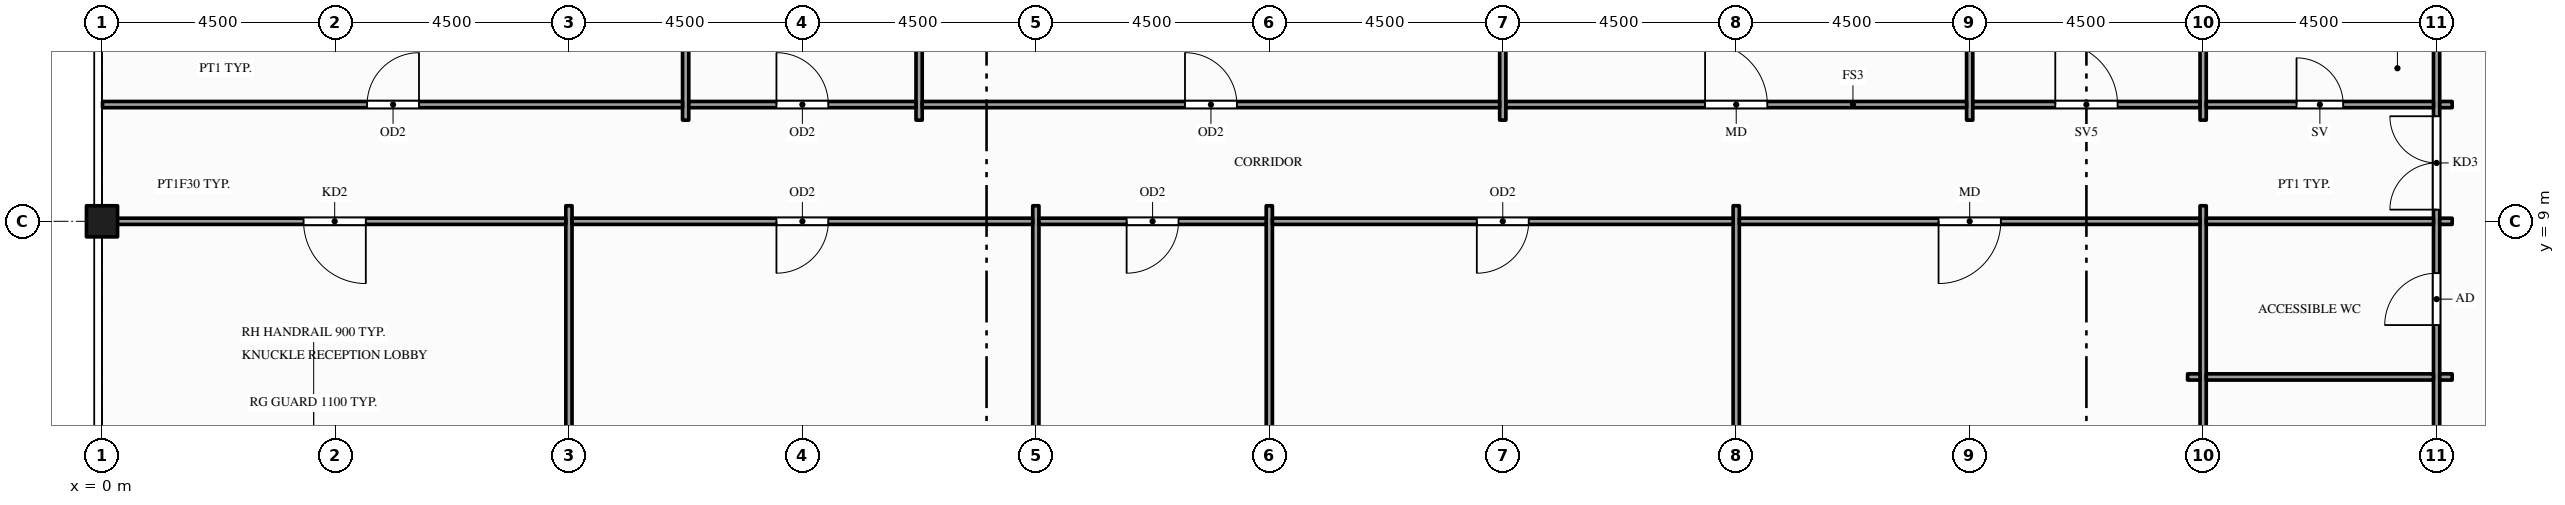
"""IFC4 building model, lengths in metres.
Left out: names, types, materials, properties, quantities, classifications, styles, units other than length and angle.
Written with IfcOpenShell. Run it as: python <this file> out.ifc"""

import sys

from ifc_helpers import new_model, si_unit, direction, frame, frame_2d, origin, origin_2d, place, context, subcontext, project, spatial, rectangle, hollow_rectangle, extrude, element, fill, save


model = new_model("IFC4")
c1 = context("Model", 3, precision=1e-05, world=origin(), true_north=direction((0.0, 1.0)))
c2 = subcontext(c1, "Body", "Model", "MODEL_VIEW")
j1 = project(units=[si_unit("LENGTHUNIT", "METRE"), si_unit("PLANEANGLEUNIT", "RADIAN")], contexts=[c1])
p1 = place(None, origin())
s1 = spatial("IfcSite", under=j1, at=p1, CompositionType="ELEMENT")
p2 = place(p1, origin())
s2 = spatial("IfcBuilding", under=s1, at=p2, CompositionType="ELEMENT")
p3 = place(p2, frame((0.0, 0.0, 309.5)))
s3 = spatial("IfcBuildingStorey", under=s2, at=p3, CompositionType="ELEMENT", Elevation=309.5)
p4 = place(p3, frame((0.0, 9.0, -0.15), z_axis=(0.0, 0.0, 1.0), x_axis=(1.0, 0.0, 0.0)))
e1 = element("IfcColumn", 1, at=p4, inside=s3, PredefinedType="COLUMN", context=c2, shape_type="SweptSolid", body=[
    extrude(hollow_rectangle(XDim=0.6, YDim=0.6, WallThickness=0.03, at=origin_2d()), origin(), (0.0, 0.0, 1.0), 4.5),
])
p5 = place(p3, frame((9.0, 3.875, 0.0), z_axis=(0.0, 0.0, 1.0), x_axis=(0.0, 1.0, 0.0)))
e2 = element("IfcWall", 2, at=p5, inside=s3, PredefinedType="PARTITIONING", context=c2, shape_type="SweptSolid", body=[
    extrude(rectangle(XDim=5.425, YDim=0.12, at=frame_2d((2.712, 0.0))), origin(), (0.0, 0.0, 1.0), 3.359),
])
for number, where, z_axis, x_axis in (
    (3, (11.25, 10.95, 0.0), (0.0, 0.0, 1.0), (0.0, 1.0, 0.0)),
    (4, (15.75, 10.95, 0.0), (0.0, 0.0, 1.0), (0.0, 1.0, 0.0)),
):
    element("IfcWall", number, at=place(p3, frame(where, z_axis=z_axis, x_axis=x_axis)), inside=s3, PredefinedType="PARTITIONING", context=c2, shape_type="SweptSolid", body=[
        extrude(rectangle(XDim=11.54, YDim=0.12, at=frame_2d((5.77, 0.0))), origin(), (0.0, 0.0, 1.0), 3.359),
    ])
for number, where, z_axis, x_axis in (
    (5, (18.0, 0.01, 0.0), (0.0, 0.0, 1.0), (0.0, 1.0, 0.0)),
    (6, (22.5, 0.01, 0.0), (0.0, 0.0, 1.0), (0.0, 1.0, 0.0)),
):
    element("IfcWall", number, at=place(p3, frame(where, z_axis=z_axis, x_axis=x_axis)), inside=s3, PredefinedType="PARTITIONING", context=c2, shape_type="SweptSolid", body=[
        extrude(rectangle(XDim=9.29, YDim=0.12, at=frame_2d((4.645, 0.0))), origin(), (0.0, 0.0, 1.0), 3.359),
    ])
p6 = place(p3, frame((27.0, 10.95, 0.0), z_axis=(0.0, 0.0, 1.0), x_axis=(0.0, 1.0, 0.0)))
e7 = element("IfcWall", 7, at=p6, inside=s3, PredefinedType="PARTITIONING", context=c2, shape_type="SweptSolid", body=[
    extrude(rectangle(XDim=11.54, YDim=0.12, at=frame_2d((5.77, 0.0))), origin(), (0.0, 0.0, 1.0), 3.359),
])
p7 = place(p3, frame((31.5, 0.01, 0.0), z_axis=(0.0, 0.0, 1.0), x_axis=(0.0, 1.0, 0.0)))
e8 = element("IfcWall", 8, at=p7, inside=s3, PredefinedType="PARTITIONING", context=c2, shape_type="SweptSolid", body=[
    extrude(rectangle(XDim=9.29, YDim=0.12, at=frame_2d((4.645, 0.0))), origin(), (0.0, 0.0, 1.0), 3.359),
])
p8 = place(p3, frame((36.0, 10.95, 0.0), z_axis=(0.0, 0.0, 1.0), x_axis=(0.0, 1.0, 0.0)))
e9 = element("IfcWall", 9, at=p8, inside=s3, PredefinedType="PARTITIONING", context=c2, shape_type="SweptSolid", body=[
    extrude(rectangle(XDim=11.54, YDim=0.12, at=frame_2d((5.77, 0.0))), origin(), (0.0, 0.0, 1.0), 3.359),
])
p9 = place(p3, frame((40.5, 0.01, 0.0), z_axis=(0.0, 0.0, 1.0), x_axis=(0.0, 1.0, 0.0)))
e10 = element("IfcWall", 10, at=p9, inside=s3, PredefinedType="PARTITIONING", context=c2, shape_type="SweptSolid", body=[
    extrude(rectangle(XDim=9.29, YDim=0.12, at=frame_2d((4.645, 0.0))), origin(), (0.0, 0.0, 1.0), 3.359),
])
p10 = place(p3, frame((40.5, 10.95, 0.0), z_axis=(0.0, 0.0, 1.0), x_axis=(0.0, 1.0, 0.0)))
e11 = element("IfcWall", 11, at=p10, inside=s3, PredefinedType="PARTITIONING", context=c2, shape_type="SweptSolid", body=[
    extrude(rectangle(XDim=11.54, YDim=0.12, at=frame_2d((5.77, 0.0))), origin(), (0.0, 0.0, 1.0), 3.359),
])
p11 = place(p3, frame((45.0, 0.01, 0.0), z_axis=(0.0, 0.0, 1.0), x_axis=(0.0, 1.0, 0.0)))
e12 = element("IfcWall", 12, at=p11, inside=s3, PredefinedType="PARTITIONING", context=c2, shape_type="SweptSolid", body=[
    extrude(rectangle(XDim=22.48, YDim=0.12, at=frame_2d((11.24, 0.0))), origin(), (0.0, 0.0, 1.0), 3.359),
])
p12 = place(p11, frame((9.215, 0.0, 0.0)))
e13 = element("IfcOpeningElement", 13, at=p12, cuts=e12, PredefinedType="OPENING", context=c2, shape_type="SweptSolid", body=[
    extrude(rectangle(XDim=1.8, YDim=2.1, at=frame_2d((0.9, 1.05))), frame((0.0, 0.07, 0.0), z_axis=(0.0, -1.0, 0.0), x_axis=(1.0, 0.0, 0.0)), (0.0, 0.0, 1.0), 0.14),
])
p13 = place(p11, frame((0.99, 0.0, 0.0)))
e14 = element("IfcOpeningElement", 14, at=p13, cuts=e12, PredefinedType="OPENING", context=c2, shape_type="SweptSolid", body=[
    extrude(rectangle(XDim=0.9, YDim=2.1, at=frame_2d((0.45, 1.05))), frame((0.0, 0.07, 0.0), z_axis=(0.0, -1.0, 0.0), x_axis=(1.0, 0.0, 0.0)), (0.0, 0.0, 1.0), 0.14),
])
p14 = place(p11, frame((4.04, 0.0, 0.0)))
e15 = element("IfcOpeningElement", 15, at=p14, cuts=e12, PredefinedType="OPENING", context=c2, shape_type="SweptSolid", body=[
    extrude(rectangle(XDim=0.9, YDim=2.1, at=frame_2d((0.45, 1.05))), frame((0.0, 0.07, 0.0), z_axis=(0.0, -1.0, 0.0), x_axis=(1.0, 0.0, 0.0)), (0.0, 0.0, 1.0), 0.14),
])
p15 = place(p11, frame((6.99, 0.0, 0.0)))
e16 = element("IfcOpeningElement", 16, at=p15, cuts=e12, PredefinedType="OPENING", context=c2, shape_type="SweptSolid", body=[
    extrude(rectangle(XDim=1.0, YDim=2.1, at=frame_2d((0.5, 1.05))), frame((0.0, 0.07, 0.0), z_axis=(0.0, -1.0, 0.0), x_axis=(1.0, 0.0, 0.0)), (0.0, 0.0, 1.0), 0.14),
])
p16 = place(p3, frame((40.2, 6.0, 0.0), z_axis=(0.0, 0.0, 1.0), x_axis=(1.0, 0.0, 0.0)))
e17 = element("IfcWall", 17, at=p16, inside=s3, PredefinedType="PARTITIONING", context=c2, shape_type="SweptSolid", body=[
    extrude(rectangle(XDim=0.24, YDim=0.12, at=frame_2d((0.12, 0.0))), origin(), (0.0, 0.0, 1.0), 3.359),
])
p17 = place(p3, frame((40.56, 6.0, 0.0), z_axis=(0.0, 0.0, 1.0), x_axis=(1.0, 0.0, 0.0)))
e18 = element("IfcWall", 18, at=p17, inside=s3, PredefinedType="PARTITIONING", context=c2, shape_type="SweptSolid", body=[
    extrude(rectangle(XDim=4.38, YDim=0.12, at=frame_2d((2.19, 0.0))), origin(), (0.0, 0.0, 1.0), 3.359),
])
p18 = place(p3, frame((45.06, 6.0, 0.0), z_axis=(0.0, 0.0, 1.0), x_axis=(1.0, 0.0, 0.0)))
e19 = element("IfcWall", 19, at=p18, inside=s3, PredefinedType="PARTITIONING", context=c2, shape_type="SweptSolid", body=[
    extrude(rectangle(XDim=0.24, YDim=0.12, at=frame_2d((0.12, 0.0))), origin(), (0.0, 0.0, 1.0), 3.359),
])
p19 = place(p3, frame((0.01, 9.0, 0.0), z_axis=(0.0, 0.0, 1.0), x_axis=(1.0, 0.0, 0.0)))
e20 = element("IfcWall", 20, at=p19, inside=s3, PredefinedType="PARTITIONING", context=c2, shape_type="SweptSolid", body=[
    extrude(rectangle(XDim=8.93, YDim=0.12, at=frame_2d((4.465, 0.0))), origin(), (0.0, 0.0, 1.0), 3.359),
])
p20 = place(p19, frame((3.875, 0.0, 0.0)))
e21 = element("IfcOpeningElement", 21, at=p20, cuts=e20, PredefinedType="OPENING", context=c2, shape_type="SweptSolid", body=[
    extrude(rectangle(XDim=1.2, YDim=2.1, at=frame_2d((0.6, 1.05))), frame((0.0, 0.07, 0.0), z_axis=(0.0, -1.0, 0.0), x_axis=(1.0, 0.0, 0.0)), (0.0, 0.0, 1.0), 0.14),
])
p21 = place(p3, frame((9.06, 9.0, 0.0), z_axis=(0.0, 0.0, 1.0), x_axis=(1.0, 0.0, 0.0)))
e22 = element("IfcWall", 22, at=p21, inside=s3, PredefinedType="PARTITIONING", context=c2, shape_type="SweptSolid", body=[
    extrude(rectangle(XDim=8.88, YDim=0.12, at=frame_2d((4.44, 0.0))), origin(), (0.0, 0.0, 1.0), 3.359),
])
p22 = place(p21, frame((3.94, 0.0, 0.0)))
e23 = element("IfcOpeningElement", 23, at=p22, cuts=e22, PredefinedType="OPENING", context=c2, shape_type="SweptSolid", body=[
    extrude(rectangle(XDim=1.0, YDim=2.1, at=frame_2d((0.5, 1.05))), frame((0.0, 0.07, 0.0), z_axis=(0.0, -1.0, 0.0), x_axis=(1.0, 0.0, 0.0)), (0.0, 0.0, 1.0), 0.14),
])
p23 = place(p3, frame((18.06, 9.0, 0.0), z_axis=(0.0, 0.0, 1.0), x_axis=(1.0, 0.0, 0.0)))
e24 = element("IfcWall", 24, at=p23, inside=s3, PredefinedType="PARTITIONING", context=c2, shape_type="SweptSolid", body=[
    extrude(rectangle(XDim=4.38, YDim=0.12, at=frame_2d((2.19, 0.0))), origin(), (0.0, 0.0, 1.0), 3.359),
])
p24 = place(p23, frame((1.69, 0.0, 0.0)))
e25 = element("IfcOpeningElement", 25, at=p24, cuts=e24, PredefinedType="OPENING", context=c2, shape_type="SweptSolid", body=[
    extrude(rectangle(XDim=1.0, YDim=2.1, at=frame_2d((0.5, 1.05))), frame((0.0, 0.07, 0.0), z_axis=(0.0, -1.0, 0.0), x_axis=(1.0, 0.0, 0.0)), (0.0, 0.0, 1.0), 0.14),
])
p25 = place(p3, frame((22.56, 9.0, 0.0), z_axis=(0.0, 0.0, 1.0), x_axis=(1.0, 0.0, 0.0)))
e26 = element("IfcWall", 26, at=p25, inside=s3, PredefinedType="PARTITIONING", context=c2, shape_type="SweptSolid", body=[
    extrude(rectangle(XDim=8.88, YDim=0.12, at=frame_2d((4.44, 0.0))), origin(), (0.0, 0.0, 1.0), 3.359),
])
p26 = place(p25, frame((3.94, 0.0, 0.0)))
e27 = element("IfcOpeningElement", 27, at=p26, cuts=e26, PredefinedType="OPENING", context=c2, shape_type="SweptSolid", body=[
    extrude(rectangle(XDim=1.0, YDim=2.1, at=frame_2d((0.5, 1.05))), frame((0.0, 0.07, 0.0), z_axis=(0.0, -1.0, 0.0), x_axis=(1.0, 0.0, 0.0)), (0.0, 0.0, 1.0), 0.14),
])
p27 = place(p3, frame((31.56, 9.0, 0.0), z_axis=(0.0, 0.0, 1.0), x_axis=(1.0, 0.0, 0.0)))
e28 = element("IfcWall", 28, at=p27, inside=s3, PredefinedType="PARTITIONING", context=c2, shape_type="SweptSolid", body=[
    extrude(rectangle(XDim=8.88, YDim=0.12, at=frame_2d((4.44, 0.0))), origin(), (0.0, 0.0, 1.0), 3.359),
])
p28 = place(p27, frame((3.84, 0.0, 0.0)))
e29 = element("IfcOpeningElement", 29, at=p28, cuts=e28, PredefinedType="OPENING", context=c2, shape_type="SweptSolid", body=[
    extrude(rectangle(XDim=1.2, YDim=2.1, at=frame_2d((0.6, 1.05))), frame((0.0, 0.07, 0.0), z_axis=(0.0, -1.0, 0.0), x_axis=(1.0, 0.0, 0.0)), (0.0, 0.0, 1.0), 0.14),
])
p29 = place(p3, frame((40.56, 9.0, 0.0), z_axis=(0.0, 0.0, 1.0), x_axis=(1.0, 0.0, 0.0)))
e30 = element("IfcWall", 30, at=p29, inside=s3, PredefinedType="PARTITIONING", context=c2, shape_type="SweptSolid", body=[
    extrude(rectangle(XDim=4.38, YDim=0.12, at=frame_2d((2.19, 0.0))), origin(), (0.0, 0.0, 1.0), 3.359),
])
p30 = place(p3, frame((45.06, 9.0, 0.0), z_axis=(0.0, 0.0, 1.0), x_axis=(1.0, 0.0, 0.0)))
e31 = element("IfcWall", 31, at=p30, inside=s3, PredefinedType="PARTITIONING", context=c2, shape_type="SweptSolid", body=[
    extrude(rectangle(XDim=0.24, YDim=0.12, at=frame_2d((0.12, 0.0))), origin(), (0.0, 0.0, 1.0), 3.359),
])
p31 = place(p3, frame((0.01, 11.25, 0.0), z_axis=(0.0, 0.0, 1.0), x_axis=(1.0, 0.0, 0.0)))
e32 = element("IfcWall", 32, at=p31, inside=s3, PredefinedType="PARTITIONING", context=c2, shape_type="SweptSolid", body=[
    extrude(rectangle(XDim=11.18, YDim=0.12, at=frame_2d((5.59, 0.0))), origin(), (0.0, 0.0, 1.0), 3.359),
])
p32 = place(p31, frame((5.1, 0.0, 0.0)))
e33 = element("IfcOpeningElement", 33, at=p32, cuts=e32, PredefinedType="OPENING", context=c2, shape_type="SweptSolid", body=[
    extrude(rectangle(XDim=1.0, YDim=2.1, at=frame_2d((0.5, 1.05))), frame((0.0, 0.07, 0.0), z_axis=(0.0, -1.0, 0.0), x_axis=(1.0, 0.0, 0.0)), (0.0, 0.0, 1.0), 0.14),
])
p33 = place(p3, frame((11.31, 11.25, 0.0), z_axis=(0.0, 0.0, 1.0), x_axis=(1.0, 0.0, 0.0)))
e34 = element("IfcWall", 34, at=p33, inside=s3, PredefinedType="PARTITIONING", context=c2, shape_type="SweptSolid", body=[
    extrude(rectangle(XDim=4.38, YDim=0.12, at=frame_2d((2.19, 0.0))), origin(), (0.0, 0.0, 1.0), 3.359),
])
p34 = place(p33, frame((1.69, 0.0, 0.0)))
e35 = element("IfcOpeningElement", 35, at=p34, cuts=e34, PredefinedType="OPENING", context=c2, shape_type="SweptSolid", body=[
    extrude(rectangle(XDim=1.0, YDim=2.1, at=frame_2d((0.5, 1.05))), frame((0.0, 0.07, 0.0), z_axis=(0.0, -1.0, 0.0), x_axis=(1.0, 0.0, 0.0)), (0.0, 0.0, 1.0), 0.14),
])
p35 = place(p3, frame((15.81, 11.25, 0.0), z_axis=(0.0, 0.0, 1.0), x_axis=(1.0, 0.0, 0.0)))
e36 = element("IfcWall", 36, at=p35, inside=s3, PredefinedType="PARTITIONING", context=c2, shape_type="SweptSolid", body=[
    extrude(rectangle(XDim=11.13, YDim=0.12, at=frame_2d((5.565, 0.0))), origin(), (0.0, 0.0, 1.0), 3.359),
])
p36 = place(p35, frame((5.065, 0.0, 0.0)))
e37 = element("IfcOpeningElement", 37, at=p36, cuts=e36, PredefinedType="OPENING", context=c2, shape_type="SweptSolid", body=[
    extrude(rectangle(XDim=1.0, YDim=2.1, at=frame_2d((0.5, 1.05))), frame((0.0, 0.07, 0.0), z_axis=(0.0, -1.0, 0.0), x_axis=(1.0, 0.0, 0.0)), (0.0, 0.0, 1.0), 0.14),
])
p37 = place(p3, frame((27.06, 11.25, 0.0), z_axis=(0.0, 0.0, 1.0), x_axis=(1.0, 0.0, 0.0)))
e38 = element("IfcWall", 38, at=p37, inside=s3, PredefinedType="PARTITIONING", context=c2, shape_type="SweptSolid", body=[
    extrude(rectangle(XDim=8.88, YDim=0.12, at=frame_2d((4.44, 0.0))), origin(), (0.0, 0.0, 1.0), 3.359),
])
p38 = place(p37, frame((3.84, 0.0, 0.0)))
e39 = element("IfcOpeningElement", 39, at=p38, cuts=e38, PredefinedType="OPENING", context=c2, shape_type="SweptSolid", body=[
    extrude(rectangle(XDim=1.2, YDim=2.1, at=frame_2d((0.6, 1.05))), frame((0.0, 0.07, 0.0), z_axis=(0.0, -1.0, 0.0), x_axis=(1.0, 0.0, 0.0)), (0.0, 0.0, 1.0), 0.14),
])
p39 = place(p3, frame((36.06, 11.25, 0.0), z_axis=(0.0, 0.0, 1.0), x_axis=(1.0, 0.0, 0.0)))
e40 = element("IfcWall", 40, at=p39, inside=s3, PredefinedType="PARTITIONING", context=c2, shape_type="SweptSolid", body=[
    extrude(rectangle(XDim=4.38, YDim=0.12, at=frame_2d((2.19, 0.0))), origin(), (0.0, 0.0, 1.0), 3.359),
])
p40 = place(p39, frame((1.59, 0.0, 0.0)))
e41 = element("IfcOpeningElement", 41, at=p40, cuts=e40, PredefinedType="OPENING", context=c2, shape_type="SweptSolid", body=[
    extrude(rectangle(XDim=1.2, YDim=2.1, at=frame_2d((0.6, 1.05))), frame((0.0, 0.07, 0.0), z_axis=(0.0, -1.0, 0.0), x_axis=(1.0, 0.0, 0.0)), (0.0, 0.0, 1.0), 0.14),
])
p41 = place(p3, frame((40.56, 11.25, 0.0), z_axis=(0.0, 0.0, 1.0), x_axis=(1.0, 0.0, 0.0)))
e42 = element("IfcWall", 42, at=p41, inside=s3, PredefinedType="PARTITIONING", context=c2, shape_type="SweptSolid", body=[
    extrude(rectangle(XDim=4.38, YDim=0.12, at=frame_2d((2.19, 0.0))), origin(), (0.0, 0.0, 1.0), 3.359),
])
p42 = place(p41, frame((1.74, 0.0, 0.0)))
e43 = element("IfcOpeningElement", 43, at=p42, cuts=e42, PredefinedType="OPENING", context=c2, shape_type="SweptSolid", body=[
    extrude(rectangle(XDim=0.9, YDim=2.1, at=frame_2d((0.45, 1.05))), frame((0.0, 0.07, 0.0), z_axis=(0.0, -1.0, 0.0), x_axis=(1.0, 0.0, 0.0)), (0.0, 0.0, 1.0), 0.14),
])
p43 = place(p3, frame((45.06, 11.25, 0.0), z_axis=(0.0, 0.0, 1.0), x_axis=(1.0, 0.0, 0.0)))
e44 = element("IfcWall", 44, at=p43, inside=s3, PredefinedType="PARTITIONING", context=c2, shape_type="SweptSolid", body=[
    extrude(rectangle(XDim=0.24, YDim=0.12, at=frame_2d((0.12, 0.0))), origin(), (0.0, 0.0, 1.0), 3.359),
])
p44 = place(p12, origin())
e45 = element("IfcDoor", 45, at=p44, inside=s3, OperationType="DOUBLE_DOOR_SINGLE_SWING", PredefinedType="DOOR", context=c2, shape_type="SweptSolid", body=[
    extrude(rectangle(XDim=1.8, YDim=2.1, at=frame_2d((0.9, 1.05))), frame((0.0, 0.025, 0.0), z_axis=(0.0, -1.0, 0.0), x_axis=(1.0, 0.0, 0.0)), (0.0, 0.0, 1.0), 0.05),
])
fill(e13, e45)
p45 = place(p20, origin())
e46 = element("IfcDoor", 46, at=p45, inside=s3, OperationType="SINGLE_SWING_RIGHT", PredefinedType="DOOR", context=c2, shape_type="SweptSolid", body=[
    extrude(rectangle(XDim=1.2, YDim=2.1, at=frame_2d((0.6, 1.05))), frame((0.0, 0.025, 0.0), z_axis=(0.0, -1.0, 0.0), x_axis=(1.0, 0.0, 0.0)), (0.0, 0.0, 1.0), 0.05),
])
fill(e21, e46)
p46 = place(p22, origin())
e47 = element("IfcDoor", 47, at=p46, inside=s3, OperationType="SINGLE_SWING_LEFT", PredefinedType="DOOR", context=c2, shape_type="SweptSolid", body=[
    extrude(rectangle(XDim=1.0, YDim=2.1, at=frame_2d((0.5, 1.05))), frame((0.0, 0.025, 0.0), z_axis=(0.0, -1.0, 0.0), x_axis=(1.0, 0.0, 0.0)), (0.0, 0.0, 1.0), 0.05),
])
fill(e23, e47)
p47 = place(p24, origin())
e48 = element("IfcDoor", 48, at=p47, inside=s3, OperationType="SINGLE_SWING_LEFT", PredefinedType="DOOR", context=c2, shape_type="SweptSolid", body=[
    extrude(rectangle(XDim=1.0, YDim=2.1, at=frame_2d((0.5, 1.05))), frame((0.0, 0.025, 0.0), z_axis=(0.0, -1.0, 0.0), x_axis=(1.0, 0.0, 0.0)), (0.0, 0.0, 1.0), 0.05),
])
fill(e25, e48)
p48 = place(p26, origin())
e49 = element("IfcDoor", 49, at=p48, inside=s3, OperationType="SINGLE_SWING_LEFT", PredefinedType="DOOR", context=c2, shape_type="SweptSolid", body=[
    extrude(rectangle(XDim=1.0, YDim=2.1, at=frame_2d((0.5, 1.05))), frame((0.0, 0.025, 0.0), z_axis=(0.0, -1.0, 0.0), x_axis=(1.0, 0.0, 0.0)), (0.0, 0.0, 1.0), 0.05),
])
fill(e27, e49)
p49 = place(p28, origin())
e50 = element("IfcDoor", 50, at=p49, inside=s3, OperationType="SINGLE_SWING_LEFT", PredefinedType="DOOR", context=c2, shape_type="SweptSolid", body=[
    extrude(rectangle(XDim=1.2, YDim=2.1, at=frame_2d((0.6, 1.05))), frame((0.0, 0.025, 0.0), z_axis=(0.0, -1.0, 0.0), x_axis=(1.0, 0.0, 0.0)), (0.0, 0.0, 1.0), 0.05),
])
fill(e29, e50)
p50 = place(p15, origin())
e51 = element("IfcDoor", 51, at=p50, inside=s3, OperationType="SINGLE_SWING_LEFT", PredefinedType="DOOR", context=c2, shape_type="SweptSolid", body=[
    extrude(rectangle(XDim=1.0, YDim=2.1, at=frame_2d((0.5, 1.05))), frame((0.0, 0.025, 0.0), z_axis=(0.0, -1.0, 0.0), x_axis=(1.0, 0.0, 0.0)), (0.0, 0.0, 1.0), 0.05),
])
fill(e16, e51)
p51 = place(p32, origin())
e52 = element("IfcDoor", 52, at=p51, inside=s3, OperationType="SINGLE_SWING_RIGHT", PredefinedType="DOOR", context=c2, shape_type="SweptSolid", body=[
    extrude(rectangle(XDim=1.0, YDim=2.1, at=frame_2d((0.5, 1.05))), frame((0.0, 0.025, 0.0), z_axis=(0.0, -1.0, 0.0), x_axis=(1.0, 0.0, 0.0)), (0.0, 0.0, 1.0), 0.05),
])
fill(e33, e52)
p52 = place(p34, origin())
e53 = element("IfcDoor", 53, at=p52, inside=s3, OperationType="SINGLE_SWING_LEFT", PredefinedType="DOOR", context=c2, shape_type="SweptSolid", body=[
    extrude(rectangle(XDim=1.0, YDim=2.1, at=frame_2d((0.5, 1.05))), frame((0.0, 0.025, 0.0), z_axis=(0.0, -1.0, 0.0), x_axis=(1.0, 0.0, 0.0)), (0.0, 0.0, 1.0), 0.05),
])
fill(e35, e53)
p53 = place(p36, origin())
e54 = element("IfcDoor", 54, at=p53, inside=s3, OperationType="SINGLE_SWING_LEFT", PredefinedType="DOOR", context=c2, shape_type="SweptSolid", body=[
    extrude(rectangle(XDim=1.0, YDim=2.1, at=frame_2d((0.5, 1.05))), frame((0.0, 0.025, 0.0), z_axis=(0.0, -1.0, 0.0), x_axis=(1.0, 0.0, 0.0)), (0.0, 0.0, 1.0), 0.05),
])
fill(e37, e54)
p54 = place(p38, origin())
e55 = element("IfcDoor", 55, at=p54, inside=s3, OperationType="SINGLE_SWING_LEFT", PredefinedType="DOOR", context=c2, shape_type="SweptSolid", body=[
    extrude(rectangle(XDim=1.2, YDim=2.1, at=frame_2d((0.6, 1.05))), frame((0.0, 0.025, 0.0), z_axis=(0.0, -1.0, 0.0), x_axis=(1.0, 0.0, 0.0)), (0.0, 0.0, 1.0), 0.05),
])
fill(e39, e55)
p55 = place(p40, origin())
e56 = element("IfcDoor", 56, at=p55, inside=s3, OperationType="SINGLE_SWING_LEFT", PredefinedType="DOOR", context=c2, shape_type="SweptSolid", body=[
    extrude(rectangle(XDim=1.2, YDim=2.1, at=frame_2d((0.6, 1.05))), frame((0.0, 0.025, 0.0), z_axis=(0.0, -1.0, 0.0), x_axis=(1.0, 0.0, 0.0)), (0.0, 0.0, 1.0), 0.05),
])
fill(e41, e56)
p56 = place(p42, origin())
e57 = element("IfcDoor", 57, at=p56, inside=s3, OperationType="SINGLE_SWING_LEFT", PredefinedType="DOOR", context=c2, shape_type="SweptSolid", body=[
    extrude(rectangle(XDim=0.9, YDim=2.1, at=frame_2d((0.45, 1.05))), frame((0.0, 0.025, 0.0), z_axis=(0.0, -1.0, 0.0), x_axis=(1.0, 0.0, 0.0)), (0.0, 0.0, 1.0), 0.05),
])
fill(e43, e57)
save(model, sys.argv[1])
